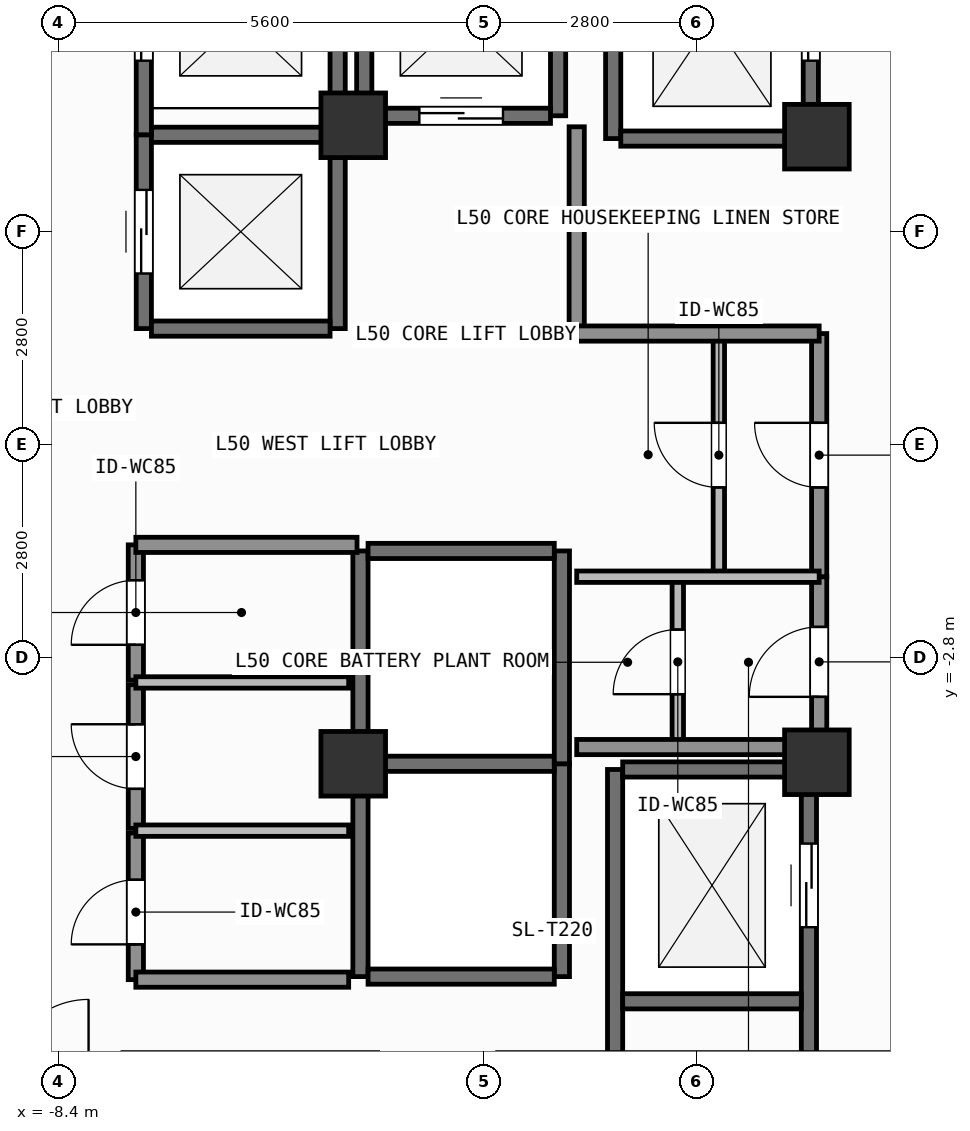
"""IFC4 building model, lengths in metres.
Left out: names, types, materials, properties, quantities, classifications, styles, units other than length and angle.
Written with IfcOpenShell. Run it as: python <this file> out.ifc"""

import sys

from ifc_helpers import new_model, si_unit, direction, frame, frame_2d, origin, origin_2d, place, context, subcontext, project, spatial, rectangle, extrude, element, fill, save


model = new_model("IFC4")
c1 = context("Model", 3, precision=1e-05, world=origin(), true_north=direction((0.0, 1.0)))
c2 = subcontext(c1, "Body", "Model", "MODEL_VIEW")
j1 = project(units=[si_unit("LENGTHUNIT", "METRE"), si_unit("PLANEANGLEUNIT", "RADIAN")], contexts=[c1])
p1 = place(None, origin())
s1 = spatial("IfcSite", under=j1, at=p1, CompositionType="ELEMENT")
p2 = place(p1, origin())
s2 = spatial("IfcBuilding", under=s1, at=p2, CompositionType="ELEMENT")
p3 = place(p2, frame((0.0, 0.0, 203.1)))
s3 = spatial("IfcBuildingStorey", under=s2, at=p3, CompositionType="ELEMENT", Elevation=203.1)
for number, where, z_axis, x_axis in (
    (1, (-4.52, -4.2, 0.0), (0.0, 0.0, 1.0), (1.0, 0.0, 0.0)),
    (2, (1.58, -4.18, 0.0), (0.0, 0.0, 1.0), (1.0, 0.0, 0.0)),
    (3, (1.58, 4.05, 0.0), (0.0, 0.0, 1.0), (1.0, 0.0, 0.0)),
    (4, (-4.52, 4.2, 0.0), (0.0, 0.0, 1.0), (1.0, 0.0, 0.0)),
):
    element("IfcColumn", number, at=place(p3, frame(where, z_axis=z_axis, x_axis=x_axis)), inside=s3, PredefinedType="COLUMN", context=c2, shape_type="SweptSolid", body=[
        extrude(rectangle(XDim=0.85, YDim=0.85, at=origin_2d()), origin(), (0.0, 0.0, 1.0), 3.9),
    ])
p4 = place(p3, frame((-7.275, 1.525, 0.0), z_axis=(0.0, 0.0, 1.0), x_axis=(0.0, 1.0, 0.0)))
e5 = element("IfcWall", 5, at=p4, inside=s3, PredefinedType="SHEAR", context=c2, shape_type="SweptSolid", body=[
    extrude(rectangle(XDim=2.55, YDim=0.2, at=frame_2d((1.275, 0.0))), origin(), (0.0, 0.0, 1.0), 3.68),
])
p5 = place(p4, frame((0.725, 0.0, 0.0)))
e6 = element("IfcOpeningElement", 6, at=p5, cuts=e5, PredefinedType="OPENING", context=c2, shape_type="SweptSolid", body=[
    extrude(rectangle(XDim=1.1, YDim=2.2, at=frame_2d((0.55, 1.1))), frame((0.0, 0.11, 0.0), z_axis=(0.0, -1.0, 0.0), x_axis=(1.0, 0.0, 0.0)), (0.0, 0.0, 1.0), 0.22),
])
p6 = place(p3, frame((-4.725, 1.525, 0.0), z_axis=(0.0, 0.0, 1.0), x_axis=(0.0, 1.0, 0.0)))
e7 = element("IfcWall", 7, at=p6, inside=s3, PredefinedType="SHEAR", context=c2, shape_type="SweptSolid", body=[
    extrude(rectangle(XDim=2.55, YDim=0.2, at=frame_2d((1.275, 0.0))), origin(), (0.0, 0.0, 1.0), 3.68),
])
for number, where, z_axis, x_axis in (
    (8, (-7.175, 1.525, 0.0), (0.0, 0.0, 1.0), (1.0, 0.0, 0.0)),
    (9, (-7.175, 4.075, 0.0), (0.0, 0.0, 1.0), (1.0, 0.0, 0.0)),
):
    element("IfcWall", number, at=place(p3, frame(where, z_axis=z_axis, x_axis=x_axis)), inside=s3, PredefinedType="SHEAR", context=c2, shape_type="SweptSolid", body=[
        extrude(rectangle(XDim=2.35, YDim=0.2, at=frame_2d((1.175, 0.0))), origin(), (0.0, 0.0, 1.0), 3.68),
    ])
p7 = place(p3, frame((-7.275, 4.075, 0.0), z_axis=(0.0, 0.0, 1.0), x_axis=(0.0, 1.0, 0.0)))
e10 = element("IfcWall", 10, at=p7, inside=s3, PredefinedType="SHEAR", context=c2, shape_type="SweptSolid", body=[
    extrude(rectangle(XDim=2.8, YDim=0.2, at=frame_2d((1.4, 0.0))), origin(), (0.0, 0.0, 1.0), 3.68),
])
p8 = place(p7, frame((0.975, 0.0, 0.0)))
e11 = element("IfcOpeningElement", 11, at=p8, cuts=e10, PredefinedType="OPENING", context=c2, shape_type="SweptSolid", body=[
    extrude(rectangle(XDim=1.1, YDim=2.2, at=frame_2d((0.55, 1.1))), frame((0.0, 0.11, 0.0), z_axis=(0.0, -1.0, 0.0), x_axis=(1.0, 0.0, 0.0)), (0.0, 0.0, 1.0), 0.22),
])
p9 = place(p3, frame((-4.725, 4.075, 0.0), z_axis=(0.0, 0.0, 1.0), x_axis=(0.0, 1.0, 0.0)))
e12 = element("IfcWall", 12, at=p9, inside=s3, PredefinedType="SHEAR", context=c2, shape_type="SweptSolid", body=[
    extrude(rectangle(XDim=2.8, YDim=0.2, at=frame_2d((1.4, 0.0))), origin(), (0.0, 0.0, 1.0), 3.68),
])
for number, where, z_axis, x_axis in (
    (13, (-4.375, 4.325, 0.0), (0.0, 0.0, 1.0), (0.0, 1.0, 0.0)),
    (14, (-1.825, 4.325, 0.0), (0.0, 0.0, 1.0), (0.0, 1.0, 0.0)),
):
    element("IfcWall", number, at=place(p3, frame(where, z_axis=z_axis, x_axis=x_axis)), inside=s3, PredefinedType="SHEAR", context=c2, shape_type="SweptSolid", body=[
        extrude(rectangle(XDim=2.55, YDim=0.2, at=frame_2d((1.275, 0.0))), origin(), (0.0, 0.0, 1.0), 3.68),
    ])
p10 = place(p3, frame((-4.275, 4.325, 0.0), z_axis=(0.0, 0.0, 1.0), x_axis=(1.0, 0.0, 0.0)))
e15 = element("IfcWall", 15, at=p10, inside=s3, PredefinedType="SHEAR", context=c2, shape_type="SweptSolid", body=[
    extrude(rectangle(XDim=2.35, YDim=0.2, at=frame_2d((1.175, 0.0))), origin(), (0.0, 0.0, 1.0), 3.68),
])
p11 = place(p10, frame((0.625, 0.0, 0.0)))
e16 = element("IfcOpeningElement", 16, at=p11, cuts=e15, PredefinedType="OPENING", context=c2, shape_type="SweptSolid", body=[
    extrude(rectangle(XDim=1.1, YDim=2.2, at=frame_2d((0.55, 1.1))), frame((0.0, 0.11, 0.0), z_axis=(0.0, -1.0, 0.0), x_axis=(1.0, 0.0, 0.0)), (0.0, 0.0, 1.0), 0.22),
])
for number, where, z_axis, x_axis in (
    (17, (-4.425, -7.0, 0.0), (0.0, 0.0, 1.0), (0.0, 1.0, 0.0)),
    (18, (-1.775, -7.0, 0.0), (0.0, 0.0, 1.0), (0.0, 1.0, 0.0)),
):
    element("IfcWall", number, at=place(p3, frame(where, z_axis=z_axis, x_axis=x_axis)), inside=s3, PredefinedType="SHEAR", context=c2, shape_type="SweptSolid", body=[
        extrude(rectangle(XDim=2.8, YDim=0.2, at=frame_2d((1.4, 0.0))), origin(), (0.0, 0.0, 1.0), 3.68),
    ])
for number, where, z_axis, x_axis in (
    (19, (-4.325, -7.0, 0.0), (0.0, 0.0, 1.0), (1.0, 0.0, 0.0)),
    (20, (-4.325, -4.2, 0.0), (0.0, 0.0, 1.0), (1.0, 0.0, 0.0)),
):
    element("IfcWall", number, at=place(p3, frame(where, z_axis=z_axis, x_axis=x_axis)), inside=s3, PredefinedType="SHEAR", context=c2, shape_type="SweptSolid", body=[
        extrude(rectangle(XDim=2.45, YDim=0.2, at=frame_2d((1.225, 0.0))), origin(), (0.0, 0.0, 1.0), 3.68),
    ])
for number, where, z_axis, x_axis in (
    (21, (-4.425, -4.2, 0.0), (0.0, 0.0, 1.0), (0.0, 1.0, 0.0)),
    (22, (-1.775, -4.2, 0.0), (0.0, 0.0, 1.0), (0.0, 1.0, 0.0)),
):
    element("IfcWall", number, at=place(p3, frame(where, z_axis=z_axis, x_axis=x_axis)), inside=s3, PredefinedType="SHEAR", context=c2, shape_type="SweptSolid", body=[
        extrude(rectangle(XDim=2.8, YDim=0.2, at=frame_2d((1.4, 0.0))), origin(), (0.0, 0.0, 1.0), 3.68),
    ])
p12 = place(p3, frame((-4.325, -1.4, 0.0), z_axis=(0.0, 0.0, 1.0), x_axis=(1.0, 0.0, 0.0)))
e23 = element("IfcWall", 23, at=p12, inside=s3, PredefinedType="SHEAR", context=c2, shape_type="SweptSolid", body=[
    extrude(rectangle(XDim=2.45, YDim=0.2, at=frame_2d((1.225, 0.0))), origin(), (0.0, 0.0, 1.0), 3.68),
])
p13 = place(p3, frame((-1.1, 4.025, 0.0), z_axis=(0.0, 0.0, 1.0), x_axis=(0.0, 1.0, 0.0)))
e24 = element("IfcWall", 24, at=p13, inside=s3, PredefinedType="SHEAR", context=c2, shape_type="SweptSolid", body=[
    extrude(rectangle(XDim=3.15, YDim=0.2, at=frame_2d((1.575, 0.0))), origin(), (0.0, 0.0, 1.0), 3.68),
])
p14 = place(p3, frame((1.5, 4.025, 0.0), z_axis=(0.0, 0.0, 1.0), x_axis=(0.0, 1.0, 0.0)))
e25 = element("IfcWall", 25, at=p14, inside=s3, PredefinedType="SHEAR", context=c2, shape_type="SweptSolid", body=[
    extrude(rectangle(XDim=3.15, YDim=0.2, at=frame_2d((1.575, 0.0))), origin(), (0.0, 0.0, 1.0), 3.68),
])
p15 = place(p14, frame((1.025, 0.0, 0.0)))
e26 = element("IfcOpeningElement", 26, at=p15, cuts=e25, PredefinedType="OPENING", context=c2, shape_type="SweptSolid", body=[
    extrude(rectangle(XDim=1.1, YDim=2.2, at=frame_2d((0.55, 1.1))), frame((0.0, 0.11, 0.0), z_axis=(0.0, -1.0, 0.0), x_axis=(1.0, 0.0, 0.0)), (0.0, 0.0, 1.0), 0.22),
])
p16 = place(p3, frame((-1.0, 4.025, 0.0), z_axis=(0.0, 0.0, 1.0), x_axis=(1.0, 0.0, 0.0)))
e27 = element("IfcWall", 27, at=p16, inside=s3, PredefinedType="SHEAR", context=c2, shape_type="SweptSolid", body=[
    extrude(rectangle(XDim=2.4, YDim=0.2, at=frame_2d((1.2, 0.0))), origin(), (0.0, 0.0, 1.0), 3.68),
])
p17 = place(p3, frame((-1.075, -8.0, 0.0), z_axis=(0.0, 0.0, 1.0), x_axis=(0.0, 1.0, 0.0)))
e28 = element("IfcWall", 28, at=p17, inside=s3, PredefinedType="SHEAR", context=c2, shape_type="SweptSolid", body=[
    extrude(rectangle(XDim=3.725, YDim=0.2, at=frame_2d((1.863, 0.0))), origin(), (0.0, 0.0, 1.0), 3.68),
])
p18 = place(p3, frame((1.475, -8.0, 0.0), z_axis=(0.0, 0.0, 1.0), x_axis=(0.0, 1.0, 0.0)))
e29 = element("IfcWall", 29, at=p18, inside=s3, PredefinedType="SHEAR", context=c2, shape_type="SweptSolid", body=[
    extrude(rectangle(XDim=3.725, YDim=0.2, at=frame_2d((1.863, 0.0))), origin(), (0.0, 0.0, 1.0), 3.68),
])
p19 = place(p18, frame((1.65, 0.0, 0.0)))
e30 = element("IfcOpeningElement", 30, at=p19, cuts=e29, PredefinedType="OPENING", context=c2, shape_type="SweptSolid", body=[
    extrude(rectangle(XDim=1.1, YDim=2.2, at=frame_2d((0.55, 1.1))), frame((0.0, 0.11, 0.0), z_axis=(0.0, -1.0, 0.0), x_axis=(1.0, 0.0, 0.0)), (0.0, 0.0, 1.0), 0.22),
])
for number, where, z_axis, x_axis in (
    (31, (-0.975, -7.325, 0.0), (0.0, 0.0, 1.0), (1.0, 0.0, 0.0)),
    (32, (-0.975, -4.275, 0.0), (0.0, 0.0, 1.0), (1.0, 0.0, 0.0)),
):
    element("IfcWall", number, at=place(p3, frame(where, z_axis=z_axis, x_axis=x_axis)), inside=s3, PredefinedType="SHEAR", context=c2, shape_type="SweptSolid", body=[
        extrude(rectangle(XDim=2.35, YDim=0.2, at=frame_2d((1.175, 0.0))), origin(), (0.0, 0.0, 1.0), 3.68),
    ])
p20 = place(p3, frame((-0.25, -3.98, 0.0), z_axis=(0.0, 0.0, 1.0), x_axis=(0.0, 1.0, 0.0)))
e33 = element("IfcWall", 33, at=p20, inside=s3, PredefinedType="PARTITIONING", context=c2, shape_type="SweptSolid", body=[
    extrude(rectangle(XDim=2.241, YDim=0.15, at=frame_2d((1.121, 0.0))), origin(), (0.0, 0.0, 1.0), 3.68),
])
p21 = place(p20, frame((0.696, 0.0, 0.0)))
e34 = element("IfcOpeningElement", 34, at=p21, cuts=e33, PredefinedType="OPENING", context=c2, shape_type="SweptSolid", body=[
    extrude(rectangle(XDim=0.85, YDim=2.1, at=frame_2d((0.425, 1.05))), frame((0.0, 0.085, 0.0), z_axis=(0.0, -1.0, 0.0), x_axis=(1.0, 0.0, 0.0)), (0.0, 0.0, 1.0), 0.17),
])
p22 = place(p3, frame((0.29, -1.739, 0.0), z_axis=(0.0, 0.0, 1.0), x_axis=(0.0, 1.0, 0.0)))
e35 = element("IfcWall", 35, at=p22, inside=s3, PredefinedType="PARTITIONING", context=c2, shape_type="SweptSolid", body=[
    extrude(rectangle(XDim=3.199, YDim=0.15, at=frame_2d((1.6, 0.0))), origin(), (0.0, 0.0, 1.0), 3.68),
])
p23 = place(p22, frame((1.175, 0.0, 0.0)))
e36 = element("IfcOpeningElement", 36, at=p23, cuts=e35, PredefinedType="OPENING", context=c2, shape_type="SweptSolid", body=[
    extrude(rectangle(XDim=0.85, YDim=2.1, at=frame_2d((0.425, 1.05))), frame((0.0, 0.085, 0.0), z_axis=(0.0, -1.0, 0.0), x_axis=(1.0, 0.0, 0.0)), (0.0, 0.0, 1.0), 0.17),
])
p24 = place(p3, frame((1.61, -3.98, 0.0), z_axis=(0.0, 0.0, 1.0), x_axis=(0.0, 1.0, 0.0)))
e37 = element("IfcWall", 37, at=p24, inside=s3, PredefinedType="SOLIDWALL", context=c2, shape_type="SweptSolid", body=[
    extrude(rectangle(XDim=2.241, YDim=0.2, at=frame_2d((1.121, 0.0))), origin(), (0.0, 0.0, 1.0), 3.68),
])
p25 = place(p24, frame((0.66, 0.0, 0.0)))
e38 = element("IfcOpeningElement", 38, at=p25, cuts=e37, PredefinedType="OPENING", context=c2, shape_type="SweptSolid", body=[
    extrude(rectangle(XDim=0.92, YDim=2.1, at=frame_2d((0.46, 1.05))), frame((0.0, 0.11, 0.0), z_axis=(0.0, -1.0, 0.0), x_axis=(1.0, 0.0, 0.0)), (0.0, 0.0, 1.0), 0.22),
])
p26 = place(p3, frame((1.61, -1.739, 0.0), z_axis=(0.0, 0.0, 1.0), x_axis=(0.0, 1.0, 0.0)))
e39 = element("IfcWall", 39, at=p26, inside=s3, PredefinedType="SOLIDWALL", context=c2, shape_type="SweptSolid", body=[
    extrude(rectangle(XDim=3.199, YDim=0.2, at=frame_2d((1.6, 0.0))), origin(), (0.0, 0.0, 1.0), 3.68),
])
p27 = place(p26, frame((1.175, 0.0, 0.0)))
e40 = element("IfcOpeningElement", 40, at=p27, cuts=e39, PredefinedType="OPENING", context=c2, shape_type="SweptSolid", body=[
    extrude(rectangle(XDim=0.85, YDim=2.1, at=frame_2d((0.425, 1.05))), frame((0.0, 0.11, 0.0), z_axis=(0.0, -1.0, 0.0), x_axis=(1.0, 0.0, 0.0)), (0.0, 0.0, 1.0), 0.22),
])
p28 = place(p3, frame((-7.38, -7.04, 0.0), z_axis=(0.0, 0.0, 1.0), x_axis=(0.0, 1.0, 0.0)))
e41 = element("IfcWall", 41, at=p28, inside=s3, PredefinedType="SOLIDWALL", context=c2, shape_type="SweptSolid", body=[
    extrude(rectangle(XDim=1.93, YDim=0.2, at=frame_2d((0.965, 0.0))), origin(), (0.0, 0.0, 1.0), 3.68),
])
p29 = place(p28, frame((0.464, 0.0, 0.0)))
e42 = element("IfcOpeningElement", 42, at=p29, cuts=e41, PredefinedType="OPENING", context=c2, shape_type="SweptSolid", body=[
    extrude(rectangle(XDim=0.85, YDim=2.1, at=frame_2d((0.425, 1.05))), frame((0.0, 0.11, 0.0), z_axis=(0.0, -1.0, 0.0), x_axis=(1.0, 0.0, 0.0)), (0.0, 0.0, 1.0), 0.22),
])
p30 = place(p3, frame((-7.38, -5.05, 0.0), z_axis=(0.0, 0.0, 1.0), x_axis=(0.0, 1.0, 0.0)))
e43 = element("IfcWall", 43, at=p30, inside=s3, PredefinedType="SOLIDWALL", context=c2, shape_type="SweptSolid", body=[
    extrude(rectangle(XDim=1.89, YDim=0.2, at=frame_2d((0.945, 0.0))), origin(), (0.0, 0.0, 1.0), 3.68),
])
p31 = place(p30, frame((0.52, 0.0, 0.0)))
e44 = element("IfcOpeningElement", 44, at=p31, cuts=e43, PredefinedType="OPENING", context=c2, shape_type="SweptSolid", body=[
    extrude(rectangle(XDim=0.85, YDim=2.1, at=frame_2d((0.425, 1.05))), frame((0.0, 0.11, 0.0), z_axis=(0.0, -1.0, 0.0), x_axis=(1.0, 0.0, 0.0)), (0.0, 0.0, 1.0), 0.22),
])
p32 = place(p3, frame((-7.38, -3.1, 0.0), z_axis=(0.0, 0.0, 1.0), x_axis=(0.0, 1.0, 0.0)))
e45 = element("IfcWall", 45, at=p32, inside=s3, PredefinedType="SOLIDWALL", context=c2, shape_type="SweptSolid", body=[
    extrude(rectangle(XDim=1.78, YDim=0.2, at=frame_2d((0.89, 0.0))), origin(), (0.0, 0.0, 1.0), 3.68),
])
p33 = place(p32, frame((0.465, 0.0, 0.0)))
e46 = element("IfcOpeningElement", 46, at=p33, cuts=e45, PredefinedType="OPENING", context=c2, shape_type="SweptSolid", body=[
    extrude(rectangle(XDim=0.85, YDim=2.1, at=frame_2d((0.425, 1.05))), frame((0.0, 0.11, 0.0), z_axis=(0.0, -1.0, 0.0), x_axis=(1.0, 0.0, 0.0)), (0.0, 0.0, 1.0), 0.22),
])
p34 = place(p3, frame((-7.38, -1.32, 0.0), z_axis=(0.0, 0.0, 1.0), x_axis=(1.0, 0.0, 0.0)))
e47 = element("IfcWall", 47, at=p34, inside=s3, PredefinedType="SOLIDWALL", context=c2, shape_type="SweptSolid", body=[
    extrude(rectangle(XDim=2.91, YDim=0.2, at=frame_2d((1.455, 0.0))), origin(), (0.0, 0.0, 1.0), 3.68),
])
p35 = place(p3, frame((-1.58, 1.48, 0.0), z_axis=(0.0, 0.0, 1.0), x_axis=(0.0, 1.0, 0.0)))
e48 = element("IfcWall", 48, at=p35, inside=s3, PredefinedType="SOLIDWALL", context=c2, shape_type="SweptSolid", body=[
    extrude(rectangle(XDim=2.7, YDim=0.2, at=frame_2d((1.35, 0.0))), origin(), (0.0, 0.0, 1.0), 3.68),
])
for number, where, z_axis, x_axis in (
    (49, (-1.58, -3.98, 0.0), (0.0, 0.0, 1.0), (1.0, 0.0, 0.0)),
    (50, (-1.58, 1.46, 0.0), (0.0, 0.0, 1.0), (1.0, 0.0, 0.0)),
):
    element("IfcWall", number, at=place(p3, frame(where, z_axis=z_axis, x_axis=x_axis)), inside=s3, PredefinedType="SOLIDWALL", context=c2, shape_type="SweptSolid", body=[
        extrude(rectangle(XDim=3.19, YDim=0.2, at=frame_2d((1.595, 0.0))), origin(), (0.0, 0.0, 1.0), 3.68),
    ])
p36 = place(p3, frame((-1.58, -1.739, 0.0), z_axis=(0.0, 0.0, 1.0), x_axis=(1.0, 0.0, 0.0)))
e51 = element("IfcWall", 51, at=p36, inside=s3, PredefinedType="PARTITIONING", context=c2, shape_type="SweptSolid", body=[
    extrude(rectangle(XDim=3.19, YDim=0.15, at=frame_2d((1.595, 0.0))), origin(), (0.0, 0.0, 1.0), 3.68),
])
p37 = place(p3, frame((-7.38, -7.04, 0.0), z_axis=(0.0, 0.0, 1.0), x_axis=(1.0, 0.0, 0.0)))
e52 = element("IfcWall", 52, at=p37, inside=s3, PredefinedType="SOLIDWALL", context=c2, shape_type="SweptSolid", body=[
    extrude(rectangle(XDim=2.8, YDim=0.2, at=frame_2d((1.4, 0.0))), origin(), (0.0, 0.0, 1.0), 3.68),
])
for number, where, z_axis, x_axis in (
    (53, (-7.38, -5.08, 0.0), (0.0, 0.0, 1.0), (1.0, 0.0, 0.0)),
    (54, (-7.38, -3.13, 0.0), (0.0, 0.0, 1.0), (1.0, 0.0, 0.0)),
):
    element("IfcWall", number, at=place(p3, frame(where, z_axis=z_axis, x_axis=x_axis)), inside=s3, PredefinedType="PARTITIONING", context=c2, shape_type="SweptSolid", body=[
        extrude(rectangle(XDim=2.8, YDim=0.15, at=frame_2d((1.4, 0.0))), origin(), (0.0, 0.0, 1.0), 3.68),
    ])
p38 = place(p5, origin())
e55 = element("IfcDoor", 55, at=p38, inside=s3, OperationType="SLIDING_TO_LEFT", PredefinedType="DOOR", context=c2, shape_type="SweptSolid", body=[
    extrude(rectangle(XDim=1.1, YDim=2.2, at=frame_2d((0.55, 1.1))), frame((0.0, 0.025, 0.0), z_axis=(0.0, -1.0, 0.0), x_axis=(1.0, 0.0, 0.0)), (0.0, 0.0, 1.0), 0.05),
])
fill(e6, e55)
p39 = place(p8, origin())
e56 = element("IfcDoor", 56, at=p39, inside=s3, OperationType="SLIDING_TO_LEFT", PredefinedType="DOOR", context=c2, shape_type="SweptSolid", body=[
    extrude(rectangle(XDim=1.1, YDim=2.2, at=frame_2d((0.55, 1.1))), frame((0.0, 0.025, 0.0), z_axis=(0.0, -1.0, 0.0), x_axis=(1.0, 0.0, 0.0)), (0.0, 0.0, 1.0), 0.05),
])
fill(e11, e56)
p40 = place(p11, origin())
e57 = element("IfcDoor", 57, at=p40, inside=s3, OperationType="SLIDING_TO_LEFT", PredefinedType="DOOR", context=c2, shape_type="SweptSolid", body=[
    extrude(rectangle(XDim=1.1, YDim=2.2, at=frame_2d((0.55, 1.1))), frame((0.0, 0.025, 0.0), z_axis=(0.0, -1.0, 0.0), x_axis=(1.0, 0.0, 0.0)), (0.0, 0.0, 1.0), 0.05),
])
fill(e16, e57)
p41 = place(p15, origin())
e58 = element("IfcDoor", 58, at=p41, inside=s3, OperationType="SLIDING_TO_LEFT", PredefinedType="DOOR", context=c2, shape_type="SweptSolid", body=[
    extrude(rectangle(XDim=1.1, YDim=2.2, at=frame_2d((0.55, 1.1))), frame((0.0, 0.025, 0.0), z_axis=(0.0, -1.0, 0.0), x_axis=(1.0, 0.0, 0.0)), (0.0, 0.0, 1.0), 0.05),
])
fill(e26, e58)
p42 = place(p19, origin())
e59 = element("IfcDoor", 59, at=p42, inside=s3, OperationType="SLIDING_TO_LEFT", PredefinedType="DOOR", context=c2, shape_type="SweptSolid", body=[
    extrude(rectangle(XDim=1.1, YDim=2.2, at=frame_2d((0.55, 1.1))), frame((0.0, 0.025, 0.0), z_axis=(0.0, -1.0, 0.0), x_axis=(1.0, 0.0, 0.0)), (0.0, 0.0, 1.0), 0.05),
])
fill(e30, e59)
p43 = place(p21, origin())
e60 = element("IfcDoor", 60, at=p43, inside=s3, OperationType="SINGLE_SWING_LEFT", PredefinedType="DOOR", context=c2, shape_type="SweptSolid", body=[
    extrude(rectangle(XDim=0.85, YDim=2.1, at=frame_2d((0.425, 1.05))), frame((0.0, 0.025, 0.0), z_axis=(0.0, -1.0, 0.0), x_axis=(1.0, 0.0, 0.0)), (0.0, 0.0, 1.0), 0.05),
])
fill(e34, e60)
p44 = place(p23, origin())
e61 = element("IfcDoor", 61, at=p44, inside=s3, OperationType="SINGLE_SWING_RIGHT", PredefinedType="DOOR", context=c2, shape_type="SweptSolid", body=[
    extrude(rectangle(XDim=0.85, YDim=2.1, at=frame_2d((0.425, 1.05))), frame((0.0, 0.025, 0.0), z_axis=(0.0, -1.0, 0.0), x_axis=(1.0, 0.0, 0.0)), (0.0, 0.0, 1.0), 0.05),
])
fill(e36, e61)
p45 = place(p25, origin())
e62 = element("IfcDoor", 62, at=p45, inside=s3, OperationType="SINGLE_SWING_LEFT", PredefinedType="DOOR", context=c2, shape_type="SweptSolid", body=[
    extrude(rectangle(XDim=0.92, YDim=2.1, at=frame_2d((0.46, 1.05))), frame((0.0, 0.025, 0.0), z_axis=(0.0, -1.0, 0.0), x_axis=(1.0, 0.0, 0.0)), (0.0, 0.0, 1.0), 0.05),
])
fill(e38, e62)
p46 = place(p27, origin())
e63 = element("IfcDoor", 63, at=p46, inside=s3, OperationType="SINGLE_SWING_RIGHT", PredefinedType="DOOR", context=c2, shape_type="SweptSolid", body=[
    extrude(rectangle(XDim=0.85, YDim=2.1, at=frame_2d((0.425, 1.05))), frame((0.0, 0.025, 0.0), z_axis=(0.0, -1.0, 0.0), x_axis=(1.0, 0.0, 0.0)), (0.0, 0.0, 1.0), 0.05),
])
fill(e40, e63)
p47 = place(p29, origin())
e64 = element("IfcDoor", 64, at=p47, inside=s3, OperationType="SINGLE_SWING_LEFT", PredefinedType="DOOR", context=c2, shape_type="SweptSolid", body=[
    extrude(rectangle(XDim=0.85, YDim=2.1, at=frame_2d((0.425, 1.05))), frame((0.0, 0.025, 0.0), z_axis=(0.0, -1.0, 0.0), x_axis=(1.0, 0.0, 0.0)), (0.0, 0.0, 1.0), 0.05),
])
fill(e42, e64)
p48 = place(p31, origin())
e65 = element("IfcDoor", 65, at=p48, inside=s3, OperationType="SINGLE_SWING_RIGHT", PredefinedType="DOOR", context=c2, shape_type="SweptSolid", body=[
    extrude(rectangle(XDim=0.85, YDim=2.1, at=frame_2d((0.425, 1.05))), frame((0.0, 0.025, 0.0), z_axis=(0.0, -1.0, 0.0), x_axis=(1.0, 0.0, 0.0)), (0.0, 0.0, 1.0), 0.05),
])
fill(e44, e65)
p49 = place(p33, origin())
e66 = element("IfcDoor", 66, at=p49, inside=s3, OperationType="SINGLE_SWING_LEFT", PredefinedType="DOOR", context=c2, shape_type="SweptSolid", body=[
    extrude(rectangle(XDim=0.85, YDim=2.1, at=frame_2d((0.425, 1.05))), frame((0.0, 0.025, 0.0), z_axis=(0.0, -1.0, 0.0), x_axis=(1.0, 0.0, 0.0)), (0.0, 0.0, 1.0), 0.05),
])
fill(e46, e66)
save(model, sys.argv[1])
